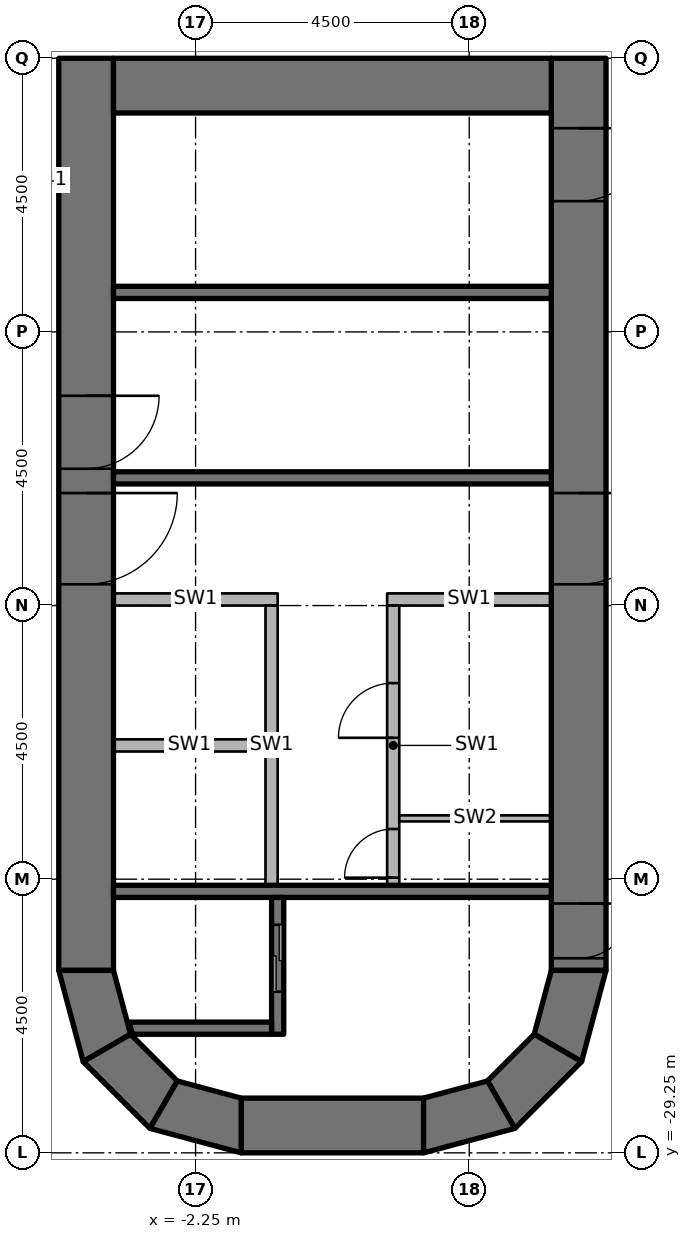
"""IFC4 building model, lengths in metres.
Left out: names, types, materials, properties, quantities, classifications, styles, units other than length and angle.
Written with IfcOpenShell. Run it as: python <this file> out.ifc"""

import sys

from ifc_helpers import new_model, si_unit, direction, frame, frame_2d, origin, place, context, subcontext, project, spatial, polyline, rectangle, outline, extrude, element, fill, save


model = new_model("IFC4")
c1 = context("Model", 3, precision=1e-05, world=origin(), true_north=direction((0.0, 1.0)))
c2 = subcontext(c1, "Body", "Model", "MODEL_VIEW")
j1 = project(units=[si_unit("LENGTHUNIT", "METRE"), si_unit("PLANEANGLEUNIT", "RADIAN")], contexts=[c1])
p1 = place(None, origin())
s1 = spatial("IfcSite", under=j1, at=p1, CompositionType="ELEMENT")
p2 = place(p1, origin())
s2 = spatial("IfcBuilding", under=s1, at=p2, CompositionType="ELEMENT")
p3 = place(p2, frame((0.0, 0.0, 81.6)))
s3 = spatial("IfcBuildingStorey", under=s2, at=p3, CompositionType="ELEMENT", Elevation=81.6)
p4 = place(p3, frame((-4.05, -11.25, 0.0), z_axis=(0.0, 0.0, 1.0), x_axis=(0.0, -1.0, 0.0)))
e1 = element("IfcWall", 1, at=p4, inside=s3, PredefinedType="SHEAR", context=c2, shape_type="SweptSolid", body=[
    extrude(rectangle(XDim=15.0, YDim=0.9, at=frame_2d((7.5, 0.0))), origin(), (0.0, 0.0, 1.0), 5.0),
])
p5 = place(p4, frame((7.15, 0.0, 0.0)))
e2 = element("IfcOpeningElement", 2, at=p5, cuts=e1, PredefinedType="OPENING", context=c2, shape_type="SweptSolid", body=[
    extrude(rectangle(XDim=1.5, YDim=2.3, at=frame_2d((0.75, 1.15))), frame((0.0, 0.46, 0.0), z_axis=(0.0, -1.0, 0.0), x_axis=(1.0, 0.0, 0.0)), (0.0, 0.0, 1.0), 0.92),
])
p6 = place(p4, frame((5.55, 0.0, 0.0)))
e3 = element("IfcOpeningElement", 3, at=p6, cuts=e1, PredefinedType="OPENING", context=c2, shape_type="SweptSolid", body=[
    extrude(rectangle(XDim=1.2, YDim=2.1, at=frame_2d((0.6, 1.05))), frame((0.0, 0.46, 0.0), z_axis=(0.0, -1.0, 0.0), x_axis=(1.0, 0.0, 0.0)), (0.0, 0.0, 1.0), 0.92),
])
p7 = place(p3, frame((4.05, -11.25, 0.0), z_axis=(0.0, 0.0, 1.0), x_axis=(0.0, -1.0, 0.0)))
e4 = element("IfcWall", 4, at=p7, inside=s3, PredefinedType="SHEAR", context=c2, shape_type="SweptSolid", body=[
    extrude(rectangle(XDim=15.0, YDim=0.9, at=frame_2d((7.5, 0.0))), origin(), (0.0, 0.0, 1.0), 5.0),
])
p8 = place(p7, frame((7.15, 0.0, 0.0)))
e5 = element("IfcOpeningElement", 5, at=p8, cuts=e4, PredefinedType="OPENING", context=c2, shape_type="SweptSolid", body=[
    extrude(rectangle(XDim=1.5, YDim=2.3, at=frame_2d((0.75, 1.15))), frame((0.0, 0.46, 0.0), z_axis=(0.0, -1.0, 0.0), x_axis=(1.0, 0.0, 0.0)), (0.0, 0.0, 1.0), 0.92),
])
p9 = place(p7, frame((13.9, 0.0, 0.0)))
e6 = element("IfcOpeningElement", 6, at=p9, cuts=e4, PredefinedType="OPENING", context=c2, shape_type="SweptSolid", body=[
    extrude(rectangle(XDim=0.9, YDim=2.1, at=frame_2d((0.45, 1.05))), frame((0.0, 0.46, 0.0), z_axis=(0.0, -1.0, 0.0), x_axis=(1.0, 0.0, 0.0)), (0.0, 0.0, 1.0), 0.92),
])
p10 = place(p7, frame((1.15, 0.0, 0.0)))
e7 = element("IfcOpeningElement", 7, at=p10, cuts=e4, PredefinedType="OPENING", context=c2, shape_type="SweptSolid", body=[
    extrude(rectangle(XDim=1.2, YDim=2.1, at=frame_2d((0.6, 1.05))), frame((0.0, 0.46, 0.0), z_axis=(0.0, -1.0, 0.0), x_axis=(1.0, 0.0, 0.0)), (0.0, 0.0, 1.0), 0.92),
])
p11 = place(p3, frame((-3.6, -11.7, 0.0), z_axis=(0.0, 0.0, 1.0), x_axis=(1.0, 0.0, 0.0)))
e8 = element("IfcWall", 8, at=p11, inside=s3, PredefinedType="SHEAR", context=c2, shape_type="SweptSolid", body=[
    extrude(rectangle(XDim=7.2, YDim=0.9, at=frame_2d((3.6, 0.0))), origin(), (0.0, 0.0, 1.0), 5.0),
])
p12 = place(p3, frame((-1.5, -28.8, 0.0), z_axis=(0.0, 0.0, 1.0), x_axis=(1.0, 0.0, 0.0)))
e9 = element("IfcWall", 9, at=p12, inside=s3, PredefinedType="SHEAR", context=c2, shape_type="SweptSolid", body=[
    extrude(rectangle(XDim=3.0, YDim=0.9, at=frame_2d((1.5, 0.0))), origin(), (0.0, 0.0, 1.0), 5.0),
])
p13 = place(p3, origin())
e10 = element("IfcWall", 10, at=p13, inside=s3, PredefinedType="SHEAR", context=c2, shape_type="SweptSolid", body=[
    extrude(outline(polyline([(-4.5, -26.25), (-4.098, -27.75), (-3.319, -27.3), (-3.6, -26.25), (-4.5, -26.25)])), origin(), (0.0, 0.0, 1.0), 5.0),
])
p14 = place(p3, origin())
e11 = element("IfcWall", 11, at=p14, inside=s3, PredefinedType="SHEAR", context=c2, shape_type="SweptSolid", body=[
    extrude(outline(polyline([(-4.098, -27.75), (-3.0, -28.848), (-2.55, -28.069), (-3.319, -27.3), (-4.098, -27.75)])), origin(), (0.0, 0.0, 1.0), 5.0),
])
p15 = place(p3, origin())
e12 = element("IfcWall", 12, at=p15, inside=s3, PredefinedType="SHEAR", context=c2, shape_type="SweptSolid", body=[
    extrude(outline(polyline([(-3.0, -28.848), (-1.5, -29.25), (-1.5, -28.35), (-2.55, -28.069), (-3.0, -28.848)])), origin(), (0.0, 0.0, 1.0), 5.0),
])
p16 = place(p3, origin())
e13 = element("IfcWall", 13, at=p16, inside=s3, PredefinedType="SHEAR", context=c2, shape_type="SweptSolid", body=[
    extrude(outline(polyline([(4.5, -26.25), (4.098, -27.75), (3.319, -27.3), (3.6, -26.25), (4.5, -26.25)])), origin(), (0.0, 0.0, 1.0), 5.0),
])
p17 = place(p3, origin())
e14 = element("IfcWall", 14, at=p17, inside=s3, PredefinedType="SHEAR", context=c2, shape_type="SweptSolid", body=[
    extrude(outline(polyline([(4.098, -27.75), (3.0, -28.848), (2.55, -28.069), (3.319, -27.3), (4.098, -27.75)])), origin(), (0.0, 0.0, 1.0), 5.0),
])
p18 = place(p3, origin())
e15 = element("IfcWall", 15, at=p18, inside=s3, PredefinedType="SHEAR", context=c2, shape_type="SweptSolid", body=[
    extrude(outline(polyline([(3.0, -28.848), (1.5, -29.25), (1.5, -28.35), (2.55, -28.069), (3.0, -28.848)])), origin(), (0.0, 0.0, 1.0), 5.0),
])
p19 = place(p3, frame((3.6, -24.95, 0.0), z_axis=(0.0, 0.0, 1.0), x_axis=(-1.0, 0.0, 0.0)))
e16 = element("IfcWall", 16, at=p19, inside=s3, PredefinedType="SHEAR", context=c2, shape_type="SweptSolid", body=[
    extrude(rectangle(XDim=7.2, YDim=0.2, at=frame_2d((3.6, 0.0))), origin(), (0.0, 0.0, 1.0), 4.85),
])
p20 = place(p3, frame((-0.9, -27.3, 0.0), z_axis=(0.0, 0.0, 1.0), x_axis=(0.0, 1.0, 0.0)))
e17 = element("IfcWall", 17, at=p20, inside=s3, PredefinedType="SHEAR", context=c2, shape_type="SweptSolid", body=[
    extrude(rectangle(XDim=2.25, YDim=0.2, at=frame_2d((1.125, 0.0))), origin(), (0.0, 0.0, 1.0), 4.85),
])
p21 = place(p20, frame((0.7, 0.0, 0.0)))
e18 = element("IfcOpeningElement", 18, at=p21, cuts=e17, PredefinedType="OPENING", context=c2, shape_type="SweptSolid", body=[
    extrude(rectangle(XDim=1.1, YDim=2.3, at=frame_2d((0.55, 1.15))), frame((0.0, 0.11, 0.0), z_axis=(0.0, -1.0, 0.0), x_axis=(1.0, 0.0, 0.0)), (0.0, 0.0, 1.0), 0.22),
])
p22 = place(p3, origin())
e19 = element("IfcWall", 19, at=p22, inside=s3, PredefinedType="SHEAR", context=c2, shape_type="SweptSolid", body=[
    extrude(outline(polyline([(-1.0, -27.1), (-3.341, -27.1), (-3.291, -27.284), (-3.275, -27.3), (-1.0, -27.3), (-1.0, -27.1)])), origin(), (0.0, 0.0, 1.0), 4.85),
])
for number, where, z_axis, x_axis in (
    (20, (3.6, -18.15, 0.0), (0.0, 0.0, 1.0), (-1.0, 0.0, 0.0)),
    (21, (3.6, -15.1, 0.0), (0.0, 0.0, 1.0), (-1.0, 0.0, 0.0)),
):
    element("IfcWall", number, at=place(p3, frame(where, z_axis=z_axis, x_axis=x_axis)), inside=s3, PredefinedType="SHEAR", context=c2, shape_type="SweptSolid", body=[
        extrude(rectangle(XDim=7.2, YDim=0.2, at=frame_2d((3.6, 0.0))), origin(), (0.0, 0.0, 1.0), 4.85),
    ])
p23 = place(p3, frame((3.6, -20.15, 0.0), z_axis=(0.0, 0.0, 1.0), x_axis=(-1.0, 0.0, 0.0)))
e22 = element("IfcWall", 22, at=p23, inside=s3, PredefinedType="PARTITIONING", context=c2, shape_type="SweptSolid", body=[
    extrude(rectangle(XDim=2.7, YDim=0.2, at=frame_2d((1.35, 0.0))), origin(), (0.0, 0.0, 1.0), 4.85),
])
p24 = place(p3, frame((1.0, -24.85, 0.0), z_axis=(0.0, 0.0, 1.0), x_axis=(0.0, 1.0, 0.0)))
e23 = element("IfcWall", 23, at=p24, inside=s3, PredefinedType="PARTITIONING", context=c2, shape_type="SweptSolid", body=[
    extrude(rectangle(XDim=4.6, YDim=0.2, at=frame_2d((2.3, 0.0))), origin(), (0.0, 0.0, 1.0), 4.85),
])
p25 = place(p24, frame((0.125, 0.0, 0.0)))
e24 = element("IfcOpeningElement", 24, at=p25, cuts=e23, PredefinedType="OPENING", context=c2, shape_type="SweptSolid", body=[
    extrude(rectangle(XDim=0.8, YDim=2.1, at=frame_2d((0.4, 1.05))), frame((0.0, 0.11, 0.0), z_axis=(0.0, -1.0, 0.0), x_axis=(1.0, 0.0, 0.0)), (0.0, 0.0, 1.0), 0.22),
])
p26 = place(p24, frame((2.425, 0.0, 0.0)))
e25 = element("IfcOpeningElement", 25, at=p26, cuts=e23, PredefinedType="OPENING", context=c2, shape_type="SweptSolid", body=[
    extrude(rectangle(XDim=0.9, YDim=2.1, at=frame_2d((0.45, 1.05))), frame((0.0, 0.11, 0.0), z_axis=(0.0, -1.0, 0.0), x_axis=(1.0, 0.0, 0.0)), (0.0, 0.0, 1.0), 0.22),
])
p27 = place(p3, frame((-0.9, -20.15, 0.0), z_axis=(0.0, 0.0, 1.0), x_axis=(-1.0, 0.0, 0.0)))
e26 = element("IfcWall", 26, at=p27, inside=s3, PredefinedType="PARTITIONING", context=c2, shape_type="SweptSolid", body=[
    extrude(rectangle(XDim=2.7, YDim=0.2, at=frame_2d((1.35, 0.0))), origin(), (0.0, 0.0, 1.0), 4.85),
])
p28 = place(p3, frame((-1.0, -24.85, 0.0), z_axis=(0.0, 0.0, 1.0), x_axis=(0.0, 1.0, 0.0)))
e27 = element("IfcWall", 27, at=p28, inside=s3, PredefinedType="PARTITIONING", context=c2, shape_type="SweptSolid", body=[
    extrude(rectangle(XDim=4.6, YDim=0.2, at=frame_2d((2.3, 0.0))), origin(), (0.0, 0.0, 1.0), 4.85),
])
p29 = place(p3, frame((3.6, -23.75, 0.0), z_axis=(0.0, 0.0, 1.0), x_axis=(-1.0, 0.0, 0.0)))
e28 = element("IfcWall", 28, at=p29, inside=s3, PredefinedType="PARTITIONING", context=c2, shape_type="SweptSolid", body=[
    extrude(rectangle(XDim=2.5, YDim=0.1, at=frame_2d((1.25, 0.0))), origin(), (0.0, 0.0, 1.0), 4.85),
])
p30 = place(p3, frame((-1.1, -22.55, 0.0), z_axis=(0.0, 0.0, 1.0), x_axis=(-1.0, 0.0, 0.0)))
e29 = element("IfcWall", 29, at=p30, inside=s3, PredefinedType="PARTITIONING", context=c2, shape_type="SweptSolid", body=[
    extrude(rectangle(XDim=2.5, YDim=0.2, at=frame_2d((1.25, 0.0))), origin(), (0.0, 0.0, 1.0), 4.85),
])
p31 = place(p8, origin())
e30 = element("IfcDoor", 30, at=p31, inside=s3, OperationType="DOUBLE_DOOR_SINGLE_SWING", PredefinedType="DOOR", context=c2, shape_type="SweptSolid", body=[
    extrude(rectangle(XDim=1.5, YDim=2.3, at=frame_2d((0.75, 1.15))), frame((0.0, 0.025, 0.0), z_axis=(0.0, -1.0, 0.0), x_axis=(1.0, 0.0, 0.0)), (0.0, 0.0, 1.0), 0.05),
])
fill(e5, e30)
p32 = place(p5, origin())
e31 = element("IfcDoor", 31, at=p32, inside=s3, OperationType="DOUBLE_DOOR_SINGLE_SWING", PredefinedType="DOOR", context=c2, shape_type="SweptSolid", body=[
    extrude(rectangle(XDim=1.5, YDim=2.3, at=frame_2d((0.75, 1.15))), frame((0.0, 0.025, 0.0), z_axis=(0.0, -1.0, 0.0), x_axis=(1.0, 0.0, 0.0)), (0.0, 0.0, 1.0), 0.05),
])
fill(e2, e31)
p33 = place(p9, origin())
e32 = element("IfcDoor", 32, at=p33, inside=s3, OperationType="SINGLE_SWING_RIGHT", PredefinedType="DOOR", context=c2, shape_type="SweptSolid", body=[
    extrude(rectangle(XDim=0.9, YDim=2.1, at=frame_2d((0.45, 1.05))), frame((0.0, 0.025, 0.0), z_axis=(0.0, -1.0, 0.0), x_axis=(1.0, 0.0, 0.0)), (0.0, 0.0, 1.0), 0.05),
])
fill(e6, e32)
p34 = place(p6, origin())
e33 = element("IfcDoor", 33, at=p34, inside=s3, OperationType="SINGLE_SWING_RIGHT", PredefinedType="DOOR", context=c2, shape_type="SweptSolid", body=[
    extrude(rectangle(XDim=1.2, YDim=2.1, at=frame_2d((0.6, 1.05))), frame((0.0, 0.025, 0.0), z_axis=(0.0, -1.0, 0.0), x_axis=(1.0, 0.0, 0.0)), (0.0, 0.0, 1.0), 0.05),
])
fill(e3, e33)
p35 = place(p10, origin())
e34 = element("IfcDoor", 34, at=p35, inside=s3, OperationType="SINGLE_SWING_RIGHT", PredefinedType="DOOR", context=c2, shape_type="SweptSolid", body=[
    extrude(rectangle(XDim=1.2, YDim=2.1, at=frame_2d((0.6, 1.05))), frame((0.0, 0.025, 0.0), z_axis=(0.0, -1.0, 0.0), x_axis=(1.0, 0.0, 0.0)), (0.0, 0.0, 1.0), 0.05),
])
fill(e7, e34)
p36 = place(p21, origin())
e35 = element("IfcDoor", 35, at=p36, inside=s3, OperationType="DOUBLE_DOOR_SLIDING", PredefinedType="DOOR", context=c2, shape_type="SweptSolid", body=[
    extrude(rectangle(XDim=1.1, YDim=2.3, at=frame_2d((0.55, 1.15))), frame((0.0, 0.025, 0.0), z_axis=(0.0, -1.0, 0.0), x_axis=(1.0, 0.0, 0.0)), (0.0, 0.0, 1.0), 0.05),
])
fill(e18, e35)
p37 = place(p25, origin())
e36 = element("IfcDoor", 36, at=p37, inside=s3, OperationType="SINGLE_SWING_LEFT", PredefinedType="DOOR", context=c2, shape_type="SweptSolid", body=[
    extrude(rectangle(XDim=0.8, YDim=2.1, at=frame_2d((0.4, 1.05))), frame((0.0, 0.025, 0.0), z_axis=(0.0, -1.0, 0.0), x_axis=(1.0, 0.0, 0.0)), (0.0, 0.0, 1.0), 0.05),
])
fill(e24, e36)
p38 = place(p26, origin())
e37 = element("IfcDoor", 37, at=p38, inside=s3, OperationType="SINGLE_SWING_LEFT", PredefinedType="DOOR", context=c2, shape_type="SweptSolid", body=[
    extrude(rectangle(XDim=0.9, YDim=2.1, at=frame_2d((0.45, 1.05))), frame((0.0, 0.025, 0.0), z_axis=(0.0, -1.0, 0.0), x_axis=(1.0, 0.0, 0.0)), (0.0, 0.0, 1.0), 0.05),
])
fill(e25, e37)
save(model, sys.argv[1])
